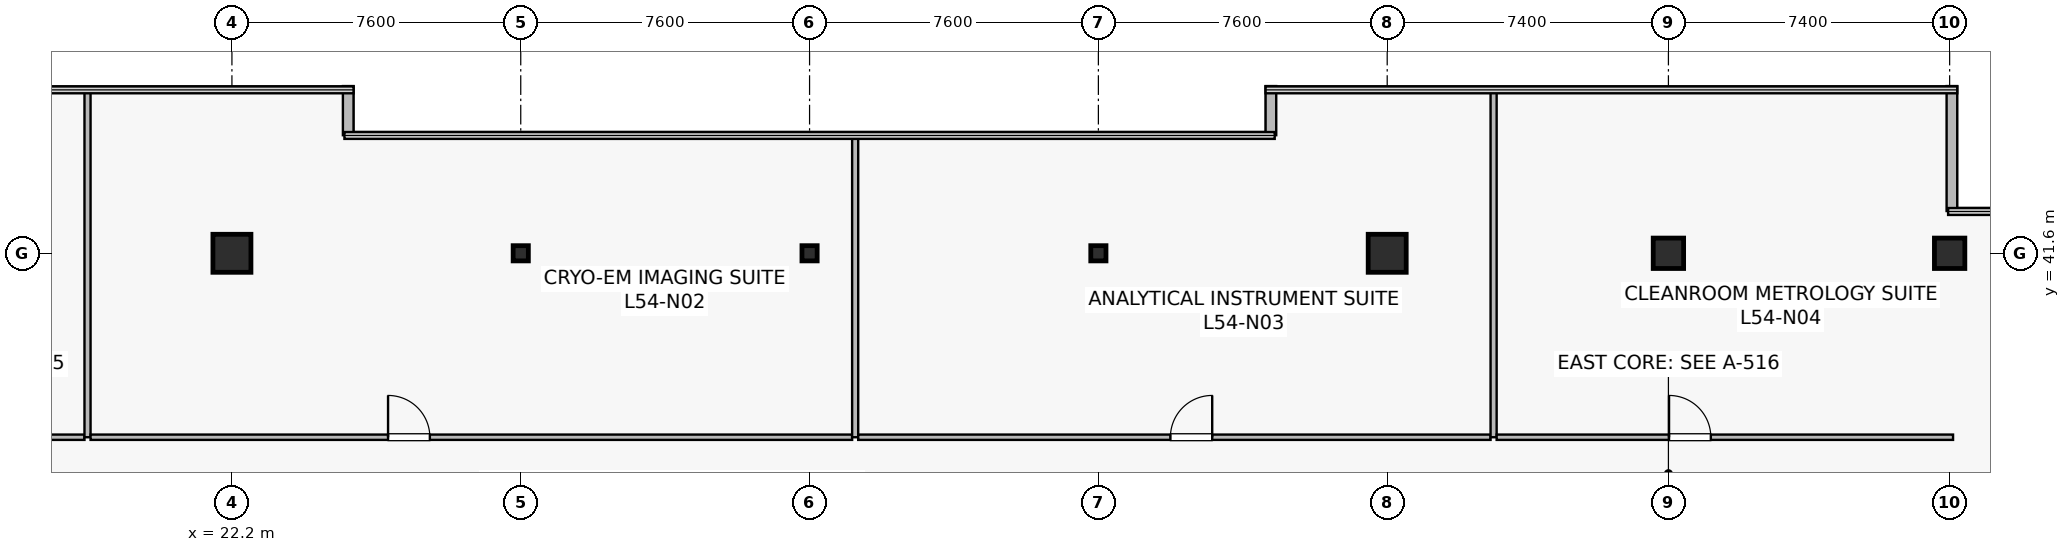
"""IFC4 building model, lengths in metres.
Left out: names, types, materials, properties, quantities, classifications, styles, units other than length and angle.
Written with IfcOpenShell. Run it as: python <this file> out.ifc"""

import sys

from ifc_helpers import new_model, si_unit, direction, frame, frame_2d, origin, origin_2d, place, context, subcontext, project, spatial, rectangle, hollow_rectangle, extrude, source, transform, mapped, element, fill, save


model = new_model("IFC4")
c1 = context("Model", 3, precision=1e-05, world=origin(), true_north=direction((0.0, 1.0)))
c2 = subcontext(c1, "Body", "Model", "MODEL_VIEW")
j1 = project(units=[si_unit("LENGTHUNIT", "METRE"), si_unit("PLANEANGLEUNIT", "RADIAN")], contexts=[c1])
p1 = place(None, origin())
s1 = spatial("IfcSite", under=j1, at=p1, CompositionType="ELEMENT")
p2 = place(p1, origin())
s2 = spatial("IfcBuilding", under=s1, at=p2, CompositionType="ELEMENT")
p3 = place(p2, frame((0.0, 0.0, 226.0)))
s3 = spatial("IfcBuildingStorey", under=s2, at=p3, CompositionType="ELEMENT", Elevation=226.0)
m1 = source(origin(), c2, "Body", "SweptSolid", [
    extrude(rectangle(XDim=1.0, YDim=1.0, at=origin_2d()), origin(), (0.0, 0.0, 1.0), 4.1),
])
for number, where, z_axis, x_axis in (
    (1, (22.2, 41.6, 0.0), (0.0, 0.0, 1.0), (1.0, 0.0, 0.0)),
    (2, (52.6, 41.6, 0.0), (0.0, 0.0, 1.0), (1.0, 0.0, 0.0)),
):
    element("IfcColumn", number, at=place(p3, frame(where, z_axis=z_axis, x_axis=x_axis)), inside=s3, PredefinedType="COLUMN", context=c2, shape_type="MappedRepresentation", body=[
        mapped(m1, transform((0.0, 0.0, 0.0), scale=1.0)),
    ])
m2 = source(origin(), c2, "Body", "SweptSolid", [
    extrude(rectangle(XDim=0.8, YDim=0.8, at=origin_2d()), origin(), (0.0, 0.0, 1.0), 4.1),
])
for number, where, z_axis, x_axis in (
    (3, (60.0, 41.6, 0.0), (0.0, 0.0, 1.0), (1.0, 0.0, 0.0)),
    (4, (67.4, 41.6, 0.0), (0.0, 0.0, 1.0), (1.0, 0.0, 0.0)),
):
    element("IfcColumn", number, at=place(p3, frame(where, z_axis=z_axis, x_axis=x_axis)), inside=s3, PredefinedType="COLUMN", context=c2, shape_type="MappedRepresentation", body=[
        mapped(m2, transform((0.0, 0.0, 0.0), scale=1.0)),
    ])
m3 = source(origin(), c2, "Body", "SweptSolid", [
    extrude(hollow_rectangle(XDim=0.4, YDim=0.4, WallThickness=0.019, at=origin_2d()), origin(), (0.0, 0.0, 1.0), 4.1),
])
for number, where, z_axis, x_axis in (
    (5, (29.8, 41.6, 0.0), (0.0, 0.0, 1.0), (1.0, 0.0, 0.0)),
    (6, (37.4, 41.6, 0.0), (0.0, 0.0, 1.0), (1.0, 0.0, 0.0)),
    (7, (45.0, 41.6, 0.0), (0.0, 0.0, 1.0), (1.0, 0.0, 0.0)),
):
    element("IfcColumn", number, at=place(p3, frame(where, z_axis=z_axis, x_axis=x_axis)), inside=s3, PredefinedType="COLUMN", context=c2, shape_type="MappedRepresentation", body=[
        mapped(m3, transform((0.0, 0.0, 0.0), scale=1.0)),
    ])
p4 = place(p3, frame((67.46, 42.712, 0.0), z_axis=(0.0, 0.0, 1.0), x_axis=(0.0, 1.0, 0.0)))
e8 = element("IfcWall", 8, at=p4, inside=s3, PredefinedType="STANDARD", context=c2, shape_type="SweptSolid", body=[
    extrude(rectangle(XDim=3.288, YDim=0.28, at=frame_2d((1.644, 0.0))), origin(), (0.0, 0.0, 1.0), 3.8),
])
for number, where, z_axis, x_axis in (
    (9, (49.54, 46.0, 0.0), (0.0, 0.0, 1.0), (0.0, -1.0, 0.0)),
    (10, (25.26, 44.707, 0.0), (0.0, 0.0, 1.0), (0.0, 1.0, 0.0)),
):
    element("IfcWall", number, at=place(p3, frame(where, z_axis=z_axis, x_axis=x_axis)), inside=s3, PredefinedType="STANDARD", context=c2, shape_type="SweptSolid", body=[
        extrude(rectangle(XDim=1.293, YDim=0.28, at=frame_2d((0.646, 0.0))), origin(), (0.0, 0.0, 1.0), 3.8),
    ])
p5 = place(p3, frame((7.31, 36.76, 0.0), z_axis=(0.0, 0.0, 1.0), x_axis=(1.0, 0.0, 0.0)))
e11 = element("IfcWall", 11, at=p5, inside=s3, PredefinedType="PARTITIONING", context=c2, shape_type="SweptSolid", body=[
    extrude(rectangle(XDim=11.01, YDim=0.14, at=frame_2d((5.505, 0.0))), origin(), (0.0, 0.0, 1.0), 3.197),
])
p6 = place(p5, frame((5.231, 0.0, 0.0)))
e12 = element("IfcOpeningElement", 12, at=p6, cuts=e11, PredefinedType="OPENING", context=c2, shape_type="SweptSolid", body=[
    extrude(rectangle(XDim=1.1, YDim=2.18, at=frame_2d((0.55, 1.09))), frame((0.0, 0.08, 0.0), z_axis=(0.0, -1.0, 0.0), x_axis=(1.0, 0.0, 0.0)), (0.0, 0.0, 1.0), 0.16),
])
p7 = place(p3, frame((18.4, 36.76, 0.0), z_axis=(0.0, 0.0, 1.0), x_axis=(0.0, 1.0, 0.0)))
e13 = element("IfcWall", 13, at=p7, inside=s3, PredefinedType="PARTITIONING", context=c2, shape_type="SweptSolid", body=[
    extrude(rectangle(XDim=9.13, YDim=0.16, at=frame_2d((4.565, 0.0))), origin(), (0.0, 0.0, 1.0), 3.135),
])
p8 = place(p3, frame((18.48, 36.76, 0.0), z_axis=(0.0, 0.0, 1.0), x_axis=(1.0, 0.0, 0.0)))
e14 = element("IfcWall", 14, at=p8, inside=s3, PredefinedType="PARTITIONING", context=c2, shape_type="SweptSolid", body=[
    extrude(rectangle(XDim=20.04, YDim=0.14, at=frame_2d((10.02, 0.0))), origin(), (0.0, 0.0, 1.0), 3.197),
])
p9 = place(p8, frame((7.828, 0.0, 0.0)))
e15 = element("IfcOpeningElement", 15, at=p9, cuts=e14, PredefinedType="OPENING", context=c2, shape_type="SweptSolid", body=[
    extrude(rectangle(XDim=1.1, YDim=2.18, at=frame_2d((0.55, 1.09))), frame((0.0, 0.08, 0.0), z_axis=(0.0, -1.0, 0.0), x_axis=(1.0, 0.0, 0.0)), (0.0, 0.0, 1.0), 0.16),
])
p10 = place(p3, frame((38.6, 36.76, 0.0), z_axis=(0.0, 0.0, 1.0), x_axis=(0.0, 1.0, 0.0)))
e16 = element("IfcWall", 16, at=p10, inside=s3, PredefinedType="PARTITIONING", context=c2, shape_type="SweptSolid", body=[
    extrude(rectangle(XDim=7.93, YDim=0.16, at=frame_2d((3.965, 0.0))), origin(), (0.0, 0.0, 1.0), 3.135),
])
p11 = place(p3, frame((38.68, 36.76, 0.0), z_axis=(0.0, 0.0, 1.0), x_axis=(1.0, 0.0, 0.0)))
e17 = element("IfcWall", 17, at=p11, inside=s3, PredefinedType="PARTITIONING", context=c2, shape_type="SweptSolid", body=[
    extrude(rectangle(XDim=16.64, YDim=0.14, at=frame_2d((8.32, 0.0))), origin(), (0.0, 0.0, 1.0), 3.197),
])
p12 = place(p11, frame((8.215, 0.0, 0.0)))
e18 = element("IfcOpeningElement", 18, at=p12, cuts=e17, PredefinedType="OPENING", context=c2, shape_type="SweptSolid", body=[
    extrude(rectangle(XDim=1.1, YDim=2.18, at=frame_2d((0.55, 1.09))), frame((0.0, 0.08, 0.0), z_axis=(0.0, -1.0, 0.0), x_axis=(1.0, 0.0, 0.0)), (0.0, 0.0, 1.0), 0.16),
])
p13 = place(p3, frame((55.4, 36.76, 0.0), z_axis=(0.0, 0.0, 1.0), x_axis=(0.0, 1.0, 0.0)))
e19 = element("IfcWall", 19, at=p13, inside=s3, PredefinedType="PARTITIONING", context=c2, shape_type="SweptSolid", body=[
    extrude(rectangle(XDim=9.13, YDim=0.16, at=frame_2d((4.565, 0.0))), origin(), (0.0, 0.0, 1.0), 3.135),
])
p14 = place(p3, frame((55.48, 36.76, 0.0), z_axis=(0.0, 0.0, 1.0), x_axis=(1.0, 0.0, 0.0)))
e20 = element("IfcWall", 20, at=p14, inside=s3, PredefinedType="PARTITIONING", context=c2, shape_type="SweptSolid", body=[
    extrude(rectangle(XDim=12.01, YDim=0.14, at=frame_2d((6.005, 0.0))), origin(), (0.0, 0.0, 1.0), 3.197),
])
p15 = place(p14, frame((4.536, 0.0, 0.0)))
e21 = element("IfcOpeningElement", 21, at=p15, cuts=e20, PredefinedType="OPENING", context=c2, shape_type="SweptSolid", body=[
    extrude(rectangle(XDim=1.1, YDim=2.18, at=frame_2d((0.55, 1.09))), frame((0.0, 0.08, 0.0), z_axis=(0.0, -1.0, 0.0), x_axis=(1.0, 0.0, 0.0)), (0.0, 0.0, 1.0), 0.16),
])
m4 = source(origin(), c2, "Body", "SweptSolid", [
    extrude(rectangle(XDim=1.1, YDim=2.18, at=frame_2d((0.55, 1.09))), frame((0.0, 0.025, 0.0), z_axis=(0.0, -1.0, 0.0), x_axis=(1.0, 0.0, 0.0)), (0.0, 0.0, 1.0), 0.05),
])
p16 = place(p9, origin())
e22 = element("IfcDoor", 22, at=p16, inside=s3, OperationType="SINGLE_SWING_LEFT", PredefinedType="DOOR", context=c2, shape_type="MappedRepresentation", body=[
    mapped(m4, transform((0.0, 0.0, 0.0), scale=1.0)),
])
fill(e15, e22)
p17 = place(p12, origin())
e23 = element("IfcDoor", 23, at=p17, inside=s3, OperationType="SINGLE_SWING_RIGHT", PredefinedType="DOOR", context=c2, shape_type="MappedRepresentation", body=[
    mapped(m4, transform((0.0, 0.0, 0.0), scale=1.0)),
])
fill(e18, e23)
p18 = place(p15, origin())
e24 = element("IfcDoor", 24, at=p18, inside=s3, OperationType="SINGLE_SWING_LEFT", PredefinedType="DOOR", context=c2, shape_type="MappedRepresentation", body=[
    mapped(m4, transform((0.0, 0.0, 0.0), scale=1.0)),
])
fill(e21, e24)
save(model, sys.argv[1])
